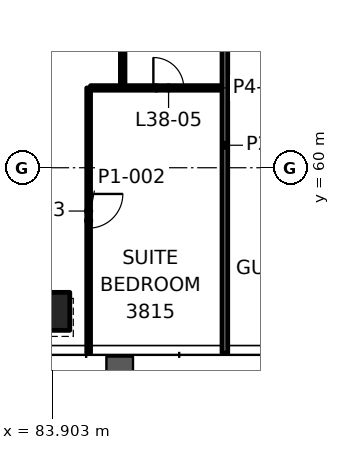
"""IFC4 building model, lengths in metres.
Left out: names, types, materials, properties, quantities, classifications, styles, units other than length and angle.
Written with IfcOpenShell. Run it as: python <this file> out.ifc"""

import sys

from ifc_helpers import new_model, si_unit, direction, frame, frame_2d, origin, origin_2d, place, context, subcontext, project, spatial, rectangle, hollow_rectangle, extrude, element, fill, save


model = new_model("IFC4")
c1 = context("Model", 3, precision=1e-05, world=origin(), true_north=direction((0.0, 1.0)))
c2 = subcontext(c1, "Body", "Model", "MODEL_VIEW")
j1 = project(units=[si_unit("LENGTHUNIT", "METRE"), si_unit("PLANEANGLEUNIT", "RADIAN")], contexts=[c1])
p1 = place(None, origin())
s1 = spatial("IfcSite", under=j1, at=p1, CompositionType="ELEMENT")
p2 = place(p1, origin())
s2 = spatial("IfcBuilding", under=s1, at=p2, CompositionType="ELEMENT")
p3 = place(p2, frame((0.0, 0.0, 167.5)))
s3 = spatial("IfcBuildingStorey", under=s2, at=p3, CompositionType="ELEMENT", Elevation=167.5)
p4 = place(p3, frame((83.962, 56.22, -0.0), z_axis=(0.0, 0.0, 1.0), x_axis=(1.0, 0.0, 0.0)))
e1 = element("IfcColumn", 1, at=p4, inside=s3, PredefinedType="COLUMN", context=c2, shape_type="SweptSolid", body=[
    extrude(hollow_rectangle(XDim=0.8, YDim=1.0, WallThickness=0.05, at=origin_2d()), origin(), (0.0, 0.0, 1.0), 3.9),
])
p5 = place(p3, frame((84.908, 62.1, 0.0), z_axis=(0.0, 0.0, 1.0), x_axis=(1.0, 0.0, 0.0)))
e2 = element("IfcWall", 2, at=p5, inside=s3, PredefinedType="PARTITIONING", context=c2, shape_type="SweptSolid", body=[
    extrude(rectangle(XDim=3.46, YDim=0.12, at=frame_2d((1.73, 0.0))), origin(), (0.0, 0.0, 1.0), 3.1),
])
p6 = place(p5, frame((1.653, 0.0, 0.0)))
e3 = element("IfcOpeningElement", 3, at=p6, cuts=e2, PredefinedType="OPENING", context=c2, shape_type="SweptSolid", body=[
    extrude(rectangle(XDim=0.8, YDim=2.1, at=frame_2d((0.4, 1.05))), frame((0.0, 0.07, 0.0), z_axis=(0.0, -1.0, 0.0), x_axis=(1.0, 0.0, 0.0)), (0.0, 0.0, 1.0), 0.14),
])
p7 = place(p3, frame((88.443, 55.121, 0.0), z_axis=(0.0, 0.0, 1.0), x_axis=(0.0, 1.0, 0.0)))
e4 = element("IfcWall", 4, at=p7, inside=s3, PredefinedType="PARTITIONING", context=c2, shape_type="SweptSolid", body=[
    extrude(rectangle(XDim=10.942, YDim=0.15, at=frame_2d((5.471, 0.0))), origin(), (0.0, 0.0, 1.0), 2.947),
])
p8 = place(p3, frame((85.754, 62.16, 0.0), z_axis=(0.0, 0.0, 1.0), x_axis=(0.0, 1.0, 0.0)))
e5 = element("IfcWall", 5, at=p8, inside=s3, PredefinedType="PARTITIONING", context=c2, shape_type="SweptSolid", body=[
    extrude(rectangle(XDim=2.865, YDim=0.12, at=frame_2d((1.433, 0.0))), origin(), (0.0, 0.0, 1.0), 3.1),
])
p9 = place(p3, frame((84.858, 62.1, 0.0), z_axis=(0.0, 0.0, 1.0), x_axis=(0.0, -1.0, 0.0)))
e6 = element("IfcWall", 6, at=p9, inside=s3, PredefinedType="PARTITIONING", context=c2, shape_type="SweptSolid", body=[
    extrude(rectangle(XDim=6.979, YDim=0.1, at=frame_2d((3.49, 0.0))), origin(), (0.0, 0.0, 1.0), 3.022),
])
p10 = place(p9, frame((2.79, 0.0, 0.0)))
e7 = element("IfcOpeningElement", 7, at=p10, cuts=e6, PredefinedType="OPENING", context=c2, shape_type="SweptSolid", body=[
    extrude(rectangle(XDim=0.9, YDim=2.1, at=frame_2d((0.45, 1.05))), frame((0.0, 0.06, 0.0), z_axis=(0.0, -1.0, 0.0), x_axis=(1.0, 0.0, 0.0)), (0.0, 0.0, 1.0), 0.12),
])
p11 = place(p3, frame((87.975, 68.548, 0.0), z_axis=(0.0, 0.0, 1.0), x_axis=(0.866029648708, -0.499992647504, 0.0)))
e8 = element("IfcWall", 8, at=p11, inside=s3, PredefinedType="PARTITIONING", context=c2, shape_type="SweptSolid", body=[
    extrude(rectangle(XDim=15.461, YDim=0.15, at=frame_2d((7.73, 0.0))), origin(), (0.0, 0.0, 1.0), 3.1),
])
p12 = place(p11, frame((1.948, 0.0, 0.0)))
e9 = element("IfcOpeningElement", 9, at=p12, cuts=e8, PredefinedType="OPENING", context=c2, shape_type="SweptSolid", body=[
    extrude(rectangle(XDim=1.0, YDim=2.1, at=frame_2d((0.5, 1.05))), frame((0.0, 0.085, 0.0), z_axis=(0.0, -1.0, 0.0), x_axis=(1.0, 0.0, 0.0)), (0.0, 0.0, 1.0), 0.17),
])
p13 = place(p11, frame((7.602, 0.0, 0.0)))
e10 = element("IfcOpeningElement", 10, at=p13, cuts=e8, PredefinedType="OPENING", context=c2, shape_type="SweptSolid", body=[
    extrude(rectangle(XDim=1.0, YDim=2.1, at=frame_2d((0.5, 1.05))), frame((0.0, 0.085, 0.0), z_axis=(0.0, -1.0, 0.0), x_axis=(1.0, 0.0, 0.0)), (0.0, 0.0, 1.0), 0.17),
])
p14 = place(p3, frame((100.464, 59.259, 0.0), z_axis=(0.0, 0.0, 1.0), x_axis=(-0.866026545444, 0.499998022582, 0.0)))
e11 = element("IfcWall", 11, at=p14, inside=s3, PredefinedType="PARTITIONING", context=c2, shape_type="SweptSolid", body=[
    extrude(rectangle(XDim=13.881, YDim=0.15, at=frame_2d((6.94, 0.0))), origin(), (0.0, 0.0, 1.0), 2.947),
])
p15 = place(p14, frame((0.566, 0.0, 0.0)))
e12 = element("IfcOpeningElement", 12, at=p15, cuts=e11, PredefinedType="OPENING", context=c2, shape_type="SweptSolid", body=[
    extrude(rectangle(XDim=1.0, YDim=2.1, at=frame_2d((0.5, 1.05))), frame((0.0, 0.085, 0.0), z_axis=(0.0, -1.0, 0.0), x_axis=(1.0, 0.0, 0.0)), (0.0, 0.0, 1.0), 0.17),
])
p16 = place(p14, frame((9.448, 0.0, 0.0)))
e13 = element("IfcOpeningElement", 13, at=p16, cuts=e11, PredefinedType="OPENING", context=c2, shape_type="SweptSolid", body=[
    extrude(rectangle(XDim=0.9, YDim=2.1, at=frame_2d((0.45, 1.05))), frame((0.0, 0.085, 0.0), z_axis=(0.0, -1.0, 0.0), x_axis=(1.0, 0.0, 0.0)), (0.0, 0.0, 1.0), 0.17),
])
p17 = place(p6, origin())
e14 = element("IfcDoor", 14, at=p17, inside=s3, OperationType="SINGLE_SWING_LEFT", PredefinedType="DOOR", context=c2, shape_type="SweptSolid", body=[
    extrude(rectangle(XDim=0.8, YDim=2.1, at=frame_2d((0.4, 1.05))), frame((0.0, 0.025, 0.0), z_axis=(0.0, -1.0, 0.0), x_axis=(1.0, 0.0, 0.0)), (0.0, 0.0, 1.0), 0.05),
])
fill(e3, e14)
p18 = place(p10, origin())
e15 = element("IfcDoor", 15, at=p18, inside=s3, OperationType="SINGLE_SWING_LEFT", PredefinedType="DOOR", context=c2, shape_type="SweptSolid", body=[
    extrude(rectangle(XDim=0.9, YDim=2.1, at=frame_2d((0.45, 1.05))), frame((0.0, 0.025, 0.0), z_axis=(0.0, -1.0, 0.0), x_axis=(1.0, 0.0, 0.0)), (0.0, 0.0, 1.0), 0.05),
])
fill(e7, e15)
p19 = place(p3, origin())
p20 = place(p19, frame((87.009, 55.076, 0.15), z_axis=(0.0, 0.0, 1.0), x_axis=(1.0, 0.0, 0.0)))
p21 = place(p20, origin())
e16 = element("IfcWindow", 16, at=p21, inside=s3, PartitioningType="SINGLE_PANEL", PredefinedType="WINDOW", context=c2, shape_type="SweptSolid", body=[
    extrude(rectangle(XDim=2.912, YDim=3.55, at=frame_2d((1.456, 1.775))), frame((0.0, 0.03, 0.0), z_axis=(0.0, -1.0, 0.0), x_axis=(1.0, 0.0, 0.0)), (0.0, 0.0, 1.0), 0.06),
])
save(model, sys.argv[1])
